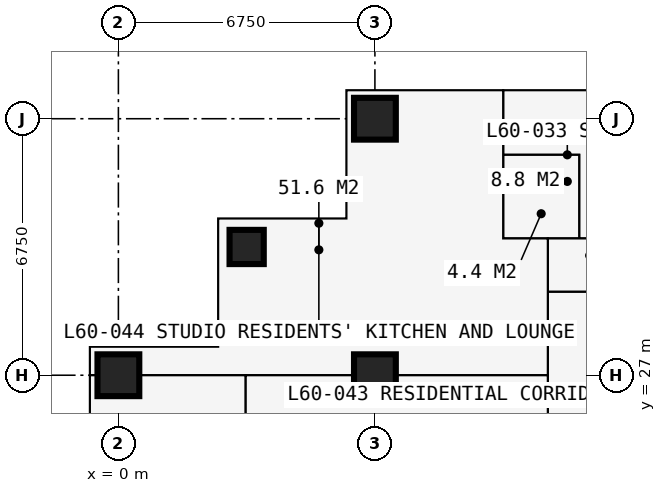
"""IFC4 building model, lengths in metres.
Left out: names, types, materials, properties, quantities, classifications, styles, units other than length and angle.
Written with IfcOpenShell. Run it as: python <this file> out.ifc"""

import sys

from ifc_helpers import new_model, si_unit, direction, frame, frame_2d, origin, origin_2d, place, context, subcontext, project, spatial, rectangle, extrude, element, fill, save


model = new_model("IFC4")
c1 = context("Model", 3, precision=1e-05, world=origin(), true_north=direction((0.0, 1.0)))
c2 = subcontext(c1, "Body", "Model", "MODEL_VIEW")
j1 = project(units=[si_unit("LENGTHUNIT", "METRE"), si_unit("PLANEANGLEUNIT", "RADIAN")], contexts=[c1])
p1 = place(None, origin())
s1 = spatial("IfcSite", under=j1, at=p1, CompositionType="ELEMENT")
p2 = place(p1, origin())
s2 = spatial("IfcBuilding", under=s1, at=p2, CompositionType="ELEMENT")
p3 = place(p2, frame((0.0, 0.0, 222.3)))
s3 = spatial("IfcBuildingStorey", under=s2, at=p3, CompositionType="ELEMENT", Elevation=222.3)
p4 = place(p3, frame((0.0, 27.0, 0.0), z_axis=(0.0, 0.0, 1.0), x_axis=(1.0, 0.0, 0.0)))
e1 = element("IfcColumn", 1, at=p4, inside=s3, PredefinedType="COLUMN", context=c2, shape_type="SweptSolid", body=[
    extrude(rectangle(XDim=1.1, YDim=1.1, at=origin_2d()), origin(), (0.0, 0.0, 1.0), 3.6),
])
p5 = place(p3, frame((3.375, 30.375, 0.0), z_axis=(0.0, 0.0, 1.0), x_axis=(1.0, 0.0, 0.0)))
e2 = element("IfcColumn", 2, at=p5, inside=s3, PredefinedType="COLUMN", context=c2, shape_type="SweptSolid", body=[
    extrude(rectangle(XDim=0.9, YDim=0.9, at=origin_2d()), origin(), (0.0, 0.0, 1.0), 3.6),
])
for number, where, z_axis, x_axis in (
    (3, (6.75, 27.0, 0.0), (0.0, 0.0, 1.0), (1.0, 0.0, 0.0)),
    (4, (6.75, 33.75, 0.0), (0.0, 0.0, 1.0), (1.0, 0.0, 0.0)),
):
    element("IfcColumn", number, at=place(p3, frame(where, z_axis=z_axis, x_axis=x_axis)), inside=s3, PredefinedType="COLUMN", context=c2, shape_type="SweptSolid", body=[
        extrude(rectangle(XDim=1.1, YDim=1.1, at=origin_2d()), origin(), (0.0, 0.0, 1.0), 3.6),
    ])
p6 = place(p3, frame((6.0, 34.5, 0.0), z_axis=(0.0, 0.0, 1.0), x_axis=(0.0, -1.0, 0.0)))
e5 = element("IfcWall", 5, at=p6, inside=s3, PredefinedType="SOLIDWALL", context=c2, shape_type="SweptSolid", body=[
    extrude(rectangle(XDim=3.375, YDim=0.3, at=frame_2d((1.688, 0.0))), origin(), (0.0, 0.0, 1.0), 3.375),
])
p7 = place(p6, frame((0.788, 0.0, 0.6)))
e6 = element("IfcOpeningElement", 6, at=p7, cuts=e5, PredefinedType="OPENING", context=c2, shape_type="SweptSolid", body=[
    extrude(rectangle(XDim=1.8, YDim=2.1, at=frame_2d((0.9, 1.05))), frame((0.0, 0.16, 0.0), z_axis=(0.0, -1.0, 0.0), x_axis=(1.0, 0.0, 0.0)), (0.0, 0.0, 1.0), 0.32),
])
p8 = place(p3, frame((6.0, 31.125, 0.0), z_axis=(0.0, 0.0, 1.0), x_axis=(-1.0, 0.0, 0.0)))
e7 = element("IfcWall", 7, at=p8, inside=s3, PredefinedType="SOLIDWALL", context=c2, shape_type="SweptSolid", body=[
    extrude(rectangle(XDim=3.375, YDim=0.3, at=frame_2d((1.688, 0.0))), origin(), (0.0, 0.0, 1.0), 3.375),
])
p9 = place(p8, frame((0.788, 0.0, 0.6)))
e8 = element("IfcOpeningElement", 8, at=p9, cuts=e7, PredefinedType="OPENING", context=c2, shape_type="SweptSolid", body=[
    extrude(rectangle(XDim=1.8, YDim=2.1, at=frame_2d((0.9, 1.05))), frame((0.0, 0.16, 0.0), z_axis=(0.0, -1.0, 0.0), x_axis=(1.0, 0.0, 0.0)), (0.0, 0.0, 1.0), 0.32),
])
p10 = place(p3, frame((2.625, 31.125, 0.0), z_axis=(0.0, 0.0, 1.0), x_axis=(0.0, -1.0, 0.0)))
e9 = element("IfcWall", 9, at=p10, inside=s3, PredefinedType="SOLIDWALL", context=c2, shape_type="SweptSolid", body=[
    extrude(rectangle(XDim=3.375, YDim=0.3, at=frame_2d((1.688, 0.0))), origin(), (0.0, 0.0, 1.0), 3.375),
])
p11 = place(p10, frame((0.788, 0.0, 0.6)))
e10 = element("IfcOpeningElement", 10, at=p11, cuts=e9, PredefinedType="OPENING", context=c2, shape_type="SweptSolid", body=[
    extrude(rectangle(XDim=1.8, YDim=2.1, at=frame_2d((0.9, 1.05))), frame((0.0, 0.16, 0.0), z_axis=(0.0, -1.0, 0.0), x_axis=(1.0, 0.0, 0.0)), (0.0, 0.0, 1.0), 0.32),
])
p12 = place(p3, frame((2.625, 27.75, 0.0), z_axis=(0.0, 0.0, 1.0), x_axis=(-1.0, 0.0, 0.0)))
e11 = element("IfcWall", 11, at=p12, inside=s3, PredefinedType="SOLIDWALL", context=c2, shape_type="SweptSolid", body=[
    extrude(rectangle(XDim=3.375, YDim=0.3, at=frame_2d((1.688, 0.0))), origin(), (0.0, 0.0, 1.0), 3.375),
])
p13 = place(p12, frame((0.788, 0.0, 0.6)))
e12 = element("IfcOpeningElement", 12, at=p13, cuts=e11, PredefinedType="OPENING", context=c2, shape_type="SweptSolid", body=[
    extrude(rectangle(XDim=1.8, YDim=2.1, at=frame_2d((0.9, 1.05))), frame((0.0, 0.16, 0.0), z_axis=(0.0, -1.0, 0.0), x_axis=(1.0, 0.0, 0.0)), (0.0, 0.0, 1.0), 0.32),
])
p14 = place(p3, frame((-0.734, 27.0, 0.0), z_axis=(0.0, 0.0, 1.0), x_axis=(1.0, 0.0, 0.0)))
e13 = element("IfcWall", 13, at=p14, inside=s3, PredefinedType="PARTITIONING", context=c2, shape_type="SweptSolid", body=[
    extrude(rectangle(XDim=12.034, YDim=0.15, at=frame_2d((6.017, 0.0))), origin(), (0.0, 0.0, 1.0), 2.877),
])
p15 = place(p3, frame((3.35, 13.5, 0.0), z_axis=(0.0, 0.0, 1.0), x_axis=(0.0, 1.0, 0.0)))
e14 = element("IfcWall", 14, at=p15, inside=s3, PredefinedType="PARTITIONING", context=c2, shape_type="SweptSolid", body=[
    extrude(rectangle(XDim=13.5, YDim=0.15, at=frame_2d((6.75, 0.0))), origin(), (0.0, 0.0, 1.0), 3.375),
])
p16 = place(p15, frame((4.2, 0.0, 0.0)))
e15 = element("IfcOpeningElement", 15, at=p16, cuts=e14, PredefinedType="OPENING", context=c2, shape_type="SweptSolid", body=[
    extrude(rectangle(XDim=0.95, YDim=2.2, at=frame_2d((0.475, 1.1))), frame((0.0, 0.085, 0.0), z_axis=(0.0, -1.0, 0.0), x_axis=(1.0, 0.0, 0.0)), (0.0, 0.0, 1.0), 0.17),
])
p17 = place(p15, frame((10.95, 0.0, 0.0)))
e16 = element("IfcOpeningElement", 16, at=p17, cuts=e14, PredefinedType="OPENING", context=c2, shape_type="SweptSolid", body=[
    extrude(rectangle(XDim=0.95, YDim=2.2, at=frame_2d((0.475, 1.1))), frame((0.0, 0.085, 0.0), z_axis=(0.0, -1.0, 0.0), x_axis=(1.0, 0.0, 0.0)), (0.0, 0.0, 1.0), 0.17),
])
p18 = place(p3, frame((10.125, 30.6, 0.0), z_axis=(0.0, 0.0, 1.0), x_axis=(0.0, 1.0, 0.0)))
e17 = element("IfcWall", 17, at=p18, inside=s3, PredefinedType="PARTITIONING", context=c2, shape_type="SweptSolid", body=[
    extrude(rectangle(XDim=3.884, YDim=0.1, at=frame_2d((1.942, 0.0))), origin(), (0.0, 0.0, 1.0), 3.375),
])
p19 = place(p3, frame((10.125, 30.6, 0.0), z_axis=(0.0, 0.0, 1.0), x_axis=(1.0, 0.0, 0.0)))
e18 = element("IfcWall", 18, at=p19, inside=s3, PredefinedType="PARTITIONING", context=c2, shape_type="SweptSolid", body=[
    extrude(rectangle(XDim=3.375, YDim=0.1, at=frame_2d((1.688, 0.0))), origin(), (0.0, 0.0, 1.0), 3.375),
])
p20 = place(p19, frame((2.2, 0.0, 0.0)))
e19 = element("IfcOpeningElement", 19, at=p20, cuts=e18, PredefinedType="OPENING", context=c2, shape_type="SweptSolid", body=[
    extrude(rectangle(XDim=0.95, YDim=2.2, at=frame_2d((0.475, 1.1))), frame((0.0, 0.06, 0.0), z_axis=(0.0, -1.0, 0.0), x_axis=(1.0, 0.0, 0.0)), (0.0, 0.0, 1.0), 0.12),
])
p21 = place(p3, frame((10.125, 32.8, 0.0), z_axis=(0.0, 0.0, 1.0), x_axis=(1.0, 0.0, 0.0)))
e20 = element("IfcWall", 20, at=p21, inside=s3, PredefinedType="PARTITIONING", context=c2, shape_type="SweptSolid", body=[
    extrude(rectangle(XDim=2.0, YDim=0.1, at=frame_2d((1.0, 0.0))), origin(), (0.0, 0.0, 1.0), 3.375),
])
p22 = place(p3, frame((11.3, 11.3, 0.0), z_axis=(0.0, 0.0, 1.0), x_axis=(0.0, 1.0, 0.0)))
e21 = element("IfcWall", 21, at=p22, inside=s3, PredefinedType="PARTITIONING", context=c2, shape_type="SweptSolid", body=[
    extrude(rectangle(XDim=19.3, YDim=0.15, at=frame_2d((9.65, 0.0))), origin(), (0.0, 0.0, 1.0), 3.375),
])
p23 = place(p22, frame((18.1, 0.0, 0.0)))
e22 = element("IfcOpeningElement", 22, at=p23, cuts=e21, PredefinedType="OPENING", context=c2, shape_type="SweptSolid", body=[
    extrude(rectangle(XDim=1.0, YDim=2.2, at=frame_2d((0.5, 1.1))), frame((0.0, 0.085, 0.0), z_axis=(0.0, -1.0, 0.0), x_axis=(1.0, 0.0, 0.0)), (0.0, 0.0, 1.0), 0.17),
])
p24 = place(p22, frame((12.137, 0.0, 0.0)))
e23 = element("IfcOpeningElement", 23, at=p24, cuts=e21, PredefinedType="OPENING", context=c2, shape_type="SweptSolid", body=[
    extrude(rectangle(XDim=1.0, YDim=2.2, at=frame_2d((0.5, 1.1))), frame((0.0, 0.085, 0.0), z_axis=(0.0, -1.0, 0.0), x_axis=(1.0, 0.0, 0.0)), (0.0, 0.0, 1.0), 0.17),
])
p25 = place(p3, frame((11.3, 29.2, 0.0), z_axis=(0.0, 0.0, 1.0), x_axis=(1.0, 0.0, 0.0)))
e24 = element("IfcWall", 24, at=p25, inside=s3, PredefinedType="PARTITIONING", context=c2, shape_type="SweptSolid", body=[
    extrude(rectangle(XDim=19.809, YDim=0.15, at=frame_2d((9.904, 0.0))), origin(), (0.0, 0.0, 1.0), 3.375),
])
p26 = place(p25, frame((16.3, 0.0, 0.0)))
e25 = element("IfcOpeningElement", 25, at=p26, cuts=e24, PredefinedType="OPENING", context=c2, shape_type="SweptSolid", body=[
    extrude(rectangle(XDim=1.0, YDim=2.2, at=frame_2d((0.5, 1.1))), frame((0.0, 0.085, 0.0), z_axis=(0.0, -1.0, 0.0), x_axis=(1.0, 0.0, 0.0)), (0.0, 0.0, 1.0), 0.17),
])
p27 = place(p25, frame((5.825, 0.0, 0.0)))
e26 = element("IfcOpeningElement", 26, at=p27, cuts=e24, PredefinedType="OPENING", context=c2, shape_type="SweptSolid", body=[
    extrude(rectangle(XDim=0.95, YDim=2.2, at=frame_2d((0.475, 1.1))), frame((0.0, 0.085, 0.0), z_axis=(0.0, -1.0, 0.0), x_axis=(1.0, 0.0, 0.0)), (0.0, 0.0, 1.0), 0.17),
])
p28 = place(p25, frame((9.2, 0.0, 0.0)))
e27 = element("IfcOpeningElement", 27, at=p28, cuts=e24, PredefinedType="OPENING", context=c2, shape_type="SweptSolid", body=[
    extrude(rectangle(XDim=0.95, YDim=2.2, at=frame_2d((0.475, 1.1))), frame((0.0, 0.085, 0.0), z_axis=(0.0, -1.0, 0.0), x_axis=(1.0, 0.0, 0.0)), (0.0, 0.0, 1.0), 0.17),
])
p29 = place(p25, frame((12.575, 0.0, 0.0)))
e28 = element("IfcOpeningElement", 28, at=p29, cuts=e24, PredefinedType="OPENING", context=c2, shape_type="SweptSolid", body=[
    extrude(rectangle(XDim=0.95, YDim=2.2, at=frame_2d((0.475, 1.1))), frame((0.0, 0.085, 0.0), z_axis=(0.0, -1.0, 0.0), x_axis=(1.0, 0.0, 0.0)), (0.0, 0.0, 1.0), 0.17),
])
p30 = place(p25, frame((0.6, 0.0, 0.0)))
e29 = element("IfcOpeningElement", 29, at=p30, cuts=e24, PredefinedType="OPENING", context=c2, shape_type="SweptSolid", body=[
    extrude(rectangle(XDim=1.0, YDim=2.2, at=frame_2d((0.5, 1.1))), frame((0.0, 0.085, 0.0), z_axis=(0.0, -1.0, 0.0), x_axis=(1.0, 0.0, 0.0)), (0.0, 0.0, 1.0), 0.17),
])
p31 = place(p3, frame((12.125, 30.6, 0.0), z_axis=(0.0, 0.0, 1.0), x_axis=(0.0, 1.0, 0.0)))
e30 = element("IfcWall", 30, at=p31, inside=s3, PredefinedType="PARTITIONING", context=c2, shape_type="SweptSolid", body=[
    extrude(rectangle(XDim=2.2, YDim=0.1, at=frame_2d((1.1, 0.0))), origin(), (0.0, 0.0, 1.0), 3.375),
])
p32 = place(p31, frame((0.65, 0.0, 0.0)))
e31 = element("IfcOpeningElement", 31, at=p32, cuts=e30, PredefinedType="OPENING", context=c2, shape_type="SweptSolid", body=[
    extrude(rectangle(XDim=0.9, YDim=2.2, at=frame_2d((0.45, 1.1))), frame((0.0, 0.06, 0.0), z_axis=(0.0, -1.0, 0.0), x_axis=(1.0, 0.0, 0.0)), (0.0, 0.0, 1.0), 0.12),
])
p33 = place(p7, origin())
e32 = element("IfcWindow", 32, at=p33, inside=s3, PartitioningType="SINGLE_PANEL", PredefinedType="WINDOW", context=c2, shape_type="SweptSolid", body=[
    extrude(rectangle(XDim=1.8, YDim=2.1, at=frame_2d((0.9, 1.05))), frame((0.0, 0.03, 0.0), z_axis=(0.0, -1.0, 0.0), x_axis=(1.0, 0.0, 0.0)), (0.0, 0.0, 1.0), 0.06),
])
fill(e6, e32)
p34 = place(p9, origin())
e33 = element("IfcWindow", 33, at=p34, inside=s3, PartitioningType="SINGLE_PANEL", PredefinedType="WINDOW", context=c2, shape_type="SweptSolid", body=[
    extrude(rectangle(XDim=1.8, YDim=2.1, at=frame_2d((0.9, 1.05))), frame((0.0, 0.03, 0.0), z_axis=(0.0, -1.0, 0.0), x_axis=(1.0, 0.0, 0.0)), (0.0, 0.0, 1.0), 0.06),
])
fill(e8, e33)
p35 = place(p11, origin())
e34 = element("IfcWindow", 34, at=p35, inside=s3, PartitioningType="SINGLE_PANEL", PredefinedType="WINDOW", context=c2, shape_type="SweptSolid", body=[
    extrude(rectangle(XDim=1.8, YDim=2.1, at=frame_2d((0.9, 1.05))), frame((0.0, 0.03, 0.0), z_axis=(0.0, -1.0, 0.0), x_axis=(1.0, 0.0, 0.0)), (0.0, 0.0, 1.0), 0.06),
])
fill(e10, e34)
p36 = place(p13, origin())
e35 = element("IfcWindow", 35, at=p36, inside=s3, PartitioningType="SINGLE_PANEL", PredefinedType="WINDOW", context=c2, shape_type="SweptSolid", body=[
    extrude(rectangle(XDim=1.8, YDim=2.1, at=frame_2d((0.9, 1.05))), frame((0.0, 0.03, 0.0), z_axis=(0.0, -1.0, 0.0), x_axis=(1.0, 0.0, 0.0)), (0.0, 0.0, 1.0), 0.06),
])
fill(e12, e35)
p37 = place(p32, origin())
e36 = element("IfcDoor", 36, at=p37, inside=s3, OperationType="SINGLE_SWING_RIGHT", PredefinedType="DOOR", context=c2, shape_type="SweptSolid", body=[
    extrude(rectangle(XDim=0.9, YDim=2.2, at=frame_2d((0.45, 1.1))), frame((0.0, 0.025, 0.0), z_axis=(0.0, -1.0, 0.0), x_axis=(1.0, 0.0, 0.0)), (0.0, 0.0, 1.0), 0.05),
])
fill(e31, e36)
p38 = place(p30, origin())
e37 = element("IfcDoor", 37, at=p38, inside=s3, OperationType="SINGLE_SWING_LEFT", PredefinedType="DOOR", context=c2, shape_type="SweptSolid", body=[
    extrude(rectangle(XDim=1.0, YDim=2.2, at=frame_2d((0.5, 1.1))), frame((0.0, 0.025, 0.0), z_axis=(0.0, -1.0, 0.0), x_axis=(1.0, 0.0, 0.0)), (0.0, 0.0, 1.0), 0.05),
])
fill(e29, e37)
p39 = place(p23, origin())
e38 = element("IfcDoor", 38, at=p39, inside=s3, OperationType="SINGLE_SWING_LEFT", PredefinedType="DOOR", context=c2, shape_type="SweptSolid", body=[
    extrude(rectangle(XDim=1.0, YDim=2.2, at=frame_2d((0.5, 1.1))), frame((0.0, 0.025, 0.0), z_axis=(0.0, -1.0, 0.0), x_axis=(1.0, 0.0, 0.0)), (0.0, 0.0, 1.0), 0.05),
])
fill(e22, e38)
save(model, sys.argv[1])
